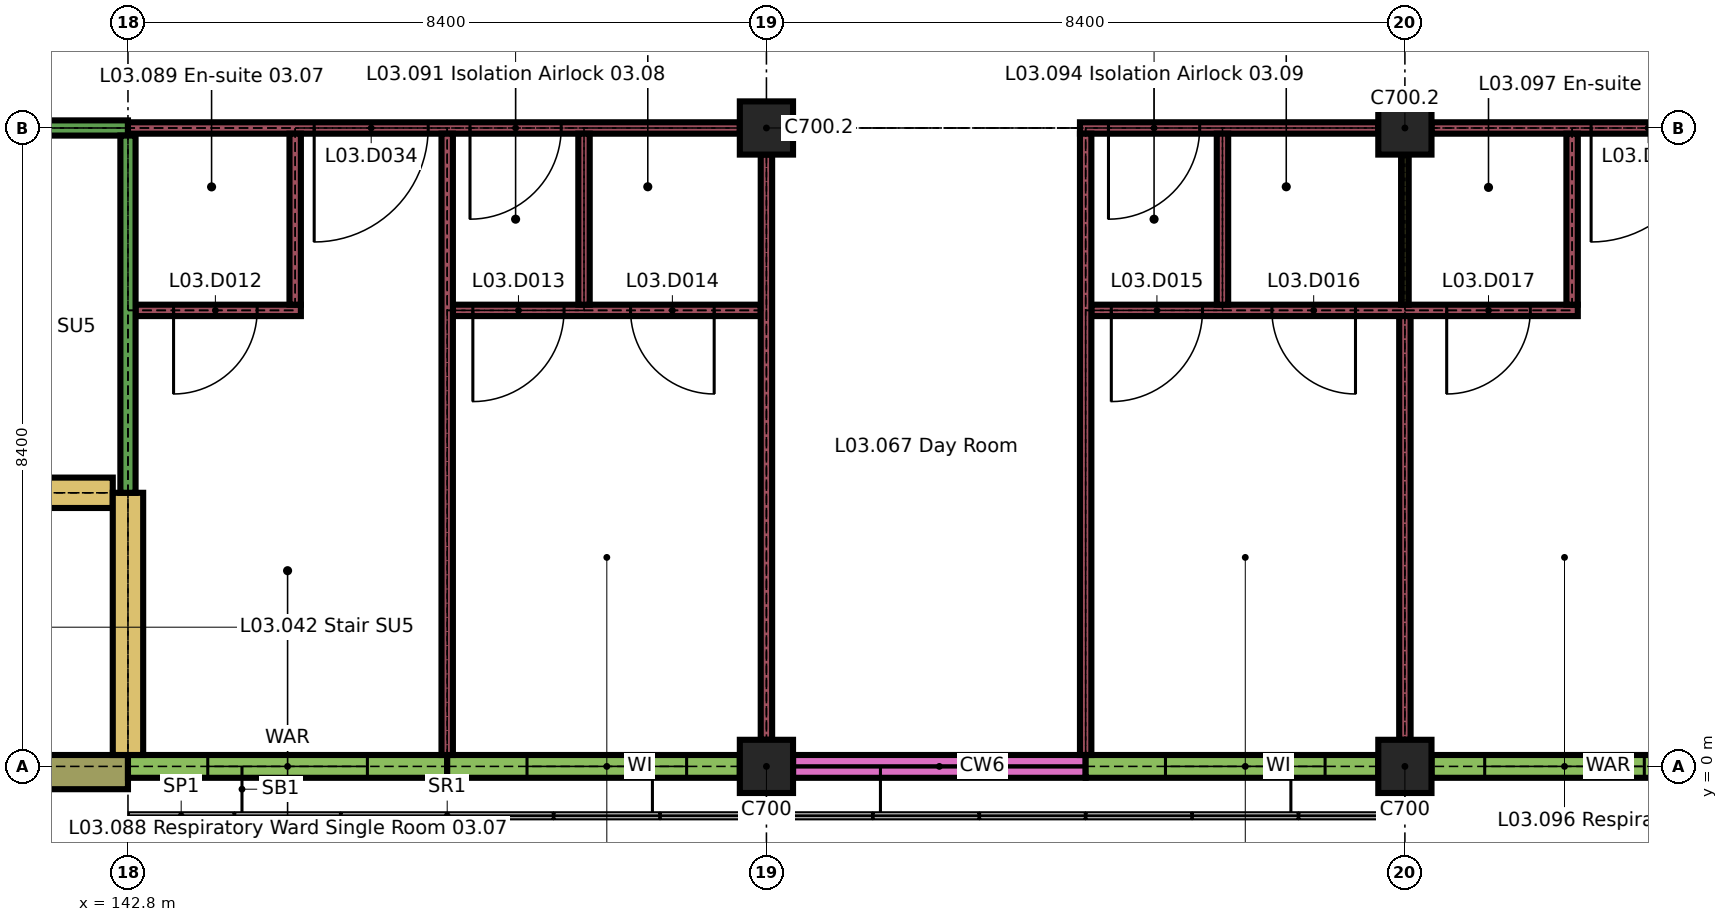
"""IFC4 building model, lengths in metres.
Left out: names, types, materials, properties, quantities, classifications, styles, units other than length and angle.
Written with IfcOpenShell. Run it as: python <this file> out.ifc"""

import sys

from ifc_helpers import new_model, si_unit, direction, frame, frame_2d, origin, origin_2d, place, context, subcontext, project, spatial, rectangle, extrude, element, fill, save


model = new_model("IFC4")
c1 = context("Model", 3, precision=1e-05, world=origin(), true_north=direction((0.0, 1.0)))
c2 = subcontext(c1, "Body", "Model", "MODEL_VIEW")
j1 = project(units=[si_unit("LENGTHUNIT", "METRE"), si_unit("PLANEANGLEUNIT", "RADIAN")], contexts=[c1])
p1 = place(None, origin())
s1 = spatial("IfcSite", under=j1, at=p1, CompositionType="ELEMENT")
p2 = place(p1, origin())
s2 = spatial("IfcBuilding", under=s1, at=p2, CompositionType="ELEMENT")
p3 = place(p2, frame((0.0, 0.0, 15.3)))
s3 = spatial("IfcBuildingStorey", under=s2, at=p3, CompositionType="ELEMENT", Elevation=15.3)
for number, where, z_axis, x_axis in (
    (1, (151.2, 0.0, 0.0), (0.0, 0.0, 1.0), (1.0, 0.0, 0.0)),
    (2, (159.6, 0.0, 0.0), (0.0, 0.0, 1.0), (1.0, 0.0, 0.0)),
    (3, (151.2, 8.4, 0.0), (0.0, 0.0, 1.0), (1.0, 0.0, 0.0)),
    (4, (159.6, 8.4, 0.0), (0.0, 0.0, 1.0), (1.0, 0.0, 0.0)),
):
    element("IfcColumn", number, at=place(p3, frame(where, z_axis=z_axis, x_axis=x_axis)), inside=s3, PredefinedType="COLUMN", context=c2, shape_type="SweptSolid", body=[
        extrude(rectangle(XDim=0.7, YDim=0.7, at=origin_2d()), origin(), (0.0, 0.0, 1.0), 3.26),
    ])
p4 = place(p3, frame((138.95, -0.075, 0.0), z_axis=(0.0, 0.0, 1.0), x_axis=(1.0, 0.0, 0.0)))
e5 = element("IfcWall", 5, at=p4, inside=s3, PredefinedType="SOLIDWALL", context=c2, shape_type="SweptSolid", body=[
    extrude(rectangle(XDim=3.85, YDim=0.45, at=frame_2d((1.925, 0.0))), origin(), (0.0, 0.0, 1.0), 3.26),
])
p5 = place(p3, frame((142.8, 0.0, 0.0), z_axis=(0.0, 0.0, 1.0), x_axis=(1.0, 0.0, 0.0)))
e6 = element("IfcWall", 6, at=p5, inside=s3, PredefinedType="SOLIDWALL", context=c2, shape_type="SweptSolid", body=[
    extrude(rectangle(XDim=4.2, YDim=0.3, at=frame_2d((2.1, 0.0))), origin(), (0.0, 0.0, 1.0), 2.96),
])
p6 = place(p5, frame((1.05, 0.0, 0.9)))
e7 = element("IfcOpeningElement", 7, at=p6, cuts=e6, PredefinedType="OPENING", context=c2, shape_type="SweptSolid", body=[
    extrude(rectangle(XDim=2.1, YDim=1.5, at=frame_2d((1.05, 0.75))), frame((0.0, 0.16, 0.0), z_axis=(0.0, -1.0, 0.0), x_axis=(1.0, 0.0, 0.0)), (0.0, 0.0, 1.0), 0.32),
])
p7 = place(p3, frame((147.0, 0.0, 0.0), z_axis=(0.0, 0.0, 1.0), x_axis=(1.0, 0.0, 0.0)))
e8 = element("IfcWall", 8, at=p7, inside=s3, PredefinedType="SOLIDWALL", context=c2, shape_type="SweptSolid", body=[
    extrude(rectangle(XDim=3.85, YDim=0.3, at=frame_2d((1.925, 0.0))), origin(), (0.0, 0.0, 1.0), 2.96),
])
p8 = place(p7, frame((1.05, 0.0, 0.9)))
e9 = element("IfcOpeningElement", 9, at=p8, cuts=e8, PredefinedType="OPENING", context=c2, shape_type="SweptSolid", body=[
    extrude(rectangle(XDim=2.1, YDim=1.5, at=frame_2d((1.05, 0.75))), frame((0.0, 0.16, 0.0), z_axis=(0.0, -1.0, 0.0), x_axis=(1.0, 0.0, 0.0)), (0.0, 0.0, 1.0), 0.32),
])
p9 = place(p3, frame((151.55, 0.0, 0.0), z_axis=(0.0, 0.0, 1.0), x_axis=(1.0, 0.0, 0.0)))
e10 = element("IfcWall", 10, at=p9, inside=s3, PredefinedType="SOLIDWALL", context=c2, shape_type="SweptSolid", body=[
    extrude(rectangle(XDim=3.85, YDim=0.3, at=frame_2d((1.925, 0.0))), origin(), (0.0, 0.0, 1.0), 0.6),
])
p10 = place(p3, frame((155.4, 0.0, 0.0), z_axis=(0.0, 0.0, 1.0), x_axis=(1.0, 0.0, 0.0)))
e11 = element("IfcWall", 11, at=p10, inside=s3, PredefinedType="SOLIDWALL", context=c2, shape_type="SweptSolid", body=[
    extrude(rectangle(XDim=3.85, YDim=0.3, at=frame_2d((1.925, 0.0))), origin(), (0.0, 0.0, 1.0), 2.96),
])
p11 = place(p10, frame((1.05, 0.0, 0.9)))
e12 = element("IfcOpeningElement", 12, at=p11, cuts=e11, PredefinedType="OPENING", context=c2, shape_type="SweptSolid", body=[
    extrude(rectangle(XDim=2.1, YDim=1.5, at=frame_2d((1.05, 0.75))), frame((0.0, 0.16, 0.0), z_axis=(0.0, -1.0, 0.0), x_axis=(1.0, 0.0, 0.0)), (0.0, 0.0, 1.0), 0.32),
])
p12 = place(p3, frame((159.95, 0.0, 0.0), z_axis=(0.0, 0.0, 1.0), x_axis=(1.0, 0.0, 0.0)))
e13 = element("IfcWall", 13, at=p12, inside=s3, PredefinedType="SOLIDWALL", context=c2, shape_type="SweptSolid", body=[
    extrude(rectangle(XDim=3.85, YDim=0.3, at=frame_2d((1.925, 0.0))), origin(), (0.0, 0.0, 1.0), 2.96),
])
p13 = place(p12, frame((0.7, 0.0, 0.9)))
e14 = element("IfcOpeningElement", 14, at=p13, cuts=e13, PredefinedType="OPENING", context=c2, shape_type="SweptSolid", body=[
    extrude(rectangle(XDim=2.1, YDim=1.5, at=frame_2d((1.05, 0.75))), frame((0.0, 0.16, 0.0), z_axis=(0.0, -1.0, 0.0), x_axis=(1.0, 0.0, 0.0)), (0.0, 0.0, 1.0), 0.32),
])
p14 = place(p3, frame((134.6, 3.6, 0.0), z_axis=(0.0, 0.0, 1.0), x_axis=(1.0, 0.0, 0.0)))
e15 = element("IfcWall", 15, at=p14, inside=s3, PredefinedType="SHEAR", context=c2, shape_type="SweptSolid", body=[
    extrude(rectangle(XDim=8.0, YDim=0.4, at=frame_2d((4.0, 0.0))), origin(), (0.0, 0.0, 1.0), 3.26),
])
p15 = place(p14, frame((0.4, 0.0, 0.0)))
e16 = element("IfcOpeningElement", 16, at=p15, cuts=e15, PredefinedType="OPENING", context=c2, shape_type="SweptSolid", body=[
    extrude(rectangle(XDim=1.2, YDim=2.1, at=frame_2d((0.6, 1.05))), frame((0.0, 0.21, 0.0), z_axis=(0.0, -1.0, 0.0), x_axis=(1.0, 0.0, 0.0)), (0.0, 0.0, 1.0), 0.42),
])
p16 = place(p3, frame((142.9, 6.0, 0.0), z_axis=(0.0, 0.0, 1.0), x_axis=(1.0, 0.0, 0.0)))
e17 = element("IfcWall", 17, at=p16, inside=s3, PredefinedType="PARTITIONING", context=c2, shape_type="SweptSolid", body=[
    extrude(rectangle(XDim=2.175, YDim=0.15, at=frame_2d((1.087, 0.0))), origin(), (0.0, 0.0, 1.0), 3.26),
])
p17 = place(p16, frame((0.5, 0.0, 0.0)))
e18 = element("IfcOpeningElement", 18, at=p17, cuts=e17, PredefinedType="OPENING", context=c2, shape_type="SweptSolid", body=[
    extrude(rectangle(XDim=1.1, YDim=2.1, at=frame_2d((0.55, 1.05))), frame((0.0, 0.085, 0.0), z_axis=(0.0, -1.0, 0.0), x_axis=(1.0, 0.0, 0.0)), (0.0, 0.0, 1.0), 0.17),
])
p18 = place(p3, frame((147.075, 6.0, 0.0), z_axis=(0.0, 0.0, 1.0), x_axis=(1.0, 0.0, 0.0)))
e19 = element("IfcWall", 19, at=p18, inside=s3, PredefinedType="PARTITIONING", context=c2, shape_type="SweptSolid", body=[
    extrude(rectangle(XDim=4.05, YDim=0.15, at=frame_2d((2.025, 0.0))), origin(), (0.0, 0.0, 1.0), 3.26),
])
p19 = place(p18, frame((0.262, 0.0, 0.0)))
e20 = element("IfcOpeningElement", 20, at=p19, cuts=e19, PredefinedType="OPENING", context=c2, shape_type="SweptSolid", body=[
    extrude(rectangle(XDim=1.2, YDim=2.1, at=frame_2d((0.6, 1.05))), frame((0.0, 0.085, 0.0), z_axis=(0.0, -1.0, 0.0), x_axis=(1.0, 0.0, 0.0)), (0.0, 0.0, 1.0), 0.17),
])
p20 = place(p18, frame((2.337, 0.0, 0.0)))
e21 = element("IfcOpeningElement", 21, at=p20, cuts=e19, PredefinedType="OPENING", context=c2, shape_type="SweptSolid", body=[
    extrude(rectangle(XDim=1.1, YDim=2.1, at=frame_2d((0.55, 1.05))), frame((0.0, 0.085, 0.0), z_axis=(0.0, -1.0, 0.0), x_axis=(1.0, 0.0, 0.0)), (0.0, 0.0, 1.0), 0.17),
])
p21 = place(p3, frame((155.475, 6.0, 0.0), z_axis=(0.0, 0.0, 1.0), x_axis=(1.0, 0.0, 0.0)))
e22 = element("IfcWall", 22, at=p21, inside=s3, PredefinedType="PARTITIONING", context=c2, shape_type="SweptSolid", body=[
    extrude(rectangle(XDim=6.4, YDim=0.15, at=frame_2d((3.2, 0.0))), origin(), (0.0, 0.0, 1.0), 3.26),
])
p22 = place(p21, frame((0.262, 0.0, 0.0)))
e23 = element("IfcOpeningElement", 23, at=p22, cuts=e22, PredefinedType="OPENING", context=c2, shape_type="SweptSolid", body=[
    extrude(rectangle(XDim=1.2, YDim=2.1, at=frame_2d((0.6, 1.05))), frame((0.0, 0.085, 0.0), z_axis=(0.0, -1.0, 0.0), x_axis=(1.0, 0.0, 0.0)), (0.0, 0.0, 1.0), 0.17),
])
p23 = place(p21, frame((2.375, 0.0, 0.0)))
e24 = element("IfcOpeningElement", 24, at=p23, cuts=e22, PredefinedType="OPENING", context=c2, shape_type="SweptSolid", body=[
    extrude(rectangle(XDim=1.1, YDim=2.1, at=frame_2d((0.55, 1.05))), frame((0.0, 0.085, 0.0), z_axis=(0.0, -1.0, 0.0), x_axis=(1.0, 0.0, 0.0)), (0.0, 0.0, 1.0), 0.17),
])
p24 = place(p21, frame((4.675, 0.0, 0.0)))
e25 = element("IfcOpeningElement", 25, at=p24, cuts=e22, PredefinedType="OPENING", context=c2, shape_type="SweptSolid", body=[
    extrude(rectangle(XDim=1.1, YDim=2.1, at=frame_2d((0.55, 1.05))), frame((0.0, 0.085, 0.0), z_axis=(0.0, -1.0, 0.0), x_axis=(1.0, 0.0, 0.0)), (0.0, 0.0, 1.0), 0.17),
])
p25 = place(p3, frame((134.3, 8.4, 0.0), z_axis=(0.0, 0.0, 1.0), x_axis=(1.0, 0.0, 0.0)))
e26 = element("IfcWall", 26, at=p25, inside=s3, PredefinedType="PARTITIONING", context=c2, shape_type="SweptSolid", body=[
    extrude(rectangle(XDim=8.5, YDim=0.2, at=frame_2d((4.25, 0.0))), origin(), (0.0, 0.0, 1.0), 3.26),
])
p26 = place(p25, frame((3.3, 0.0, 0.0)))
e27 = element("IfcOpeningElement", 27, at=p26, cuts=e26, PredefinedType="OPENING", context=c2, shape_type="SweptSolid", body=[
    extrude(rectangle(XDim=2.0, YDim=2.4, at=frame_2d((1.0, 1.2))), frame((0.0, 0.11, 0.0), z_axis=(0.0, -1.0, 0.0), x_axis=(1.0, 0.0, 0.0)), (0.0, 0.0, 1.0), 0.22),
])
p27 = place(p3, frame((142.8, 8.4, 0.0), z_axis=(0.0, 0.0, 1.0), x_axis=(1.0, 0.0, 0.0)))
e28 = element("IfcWall", 28, at=p27, inside=s3, PredefinedType="PARTITIONING", context=c2, shape_type="SweptSolid", body=[
    extrude(rectangle(XDim=8.05, YDim=0.15, at=frame_2d((4.025, 0.0))), origin(), (0.0, 0.0, 1.0), 3.26),
])
p28 = place(p27, frame((2.45, 0.0, 0.0)))
e29 = element("IfcOpeningElement", 29, at=p28, cuts=e28, PredefinedType="OPENING", context=c2, shape_type="SweptSolid", body=[
    extrude(rectangle(XDim=1.5, YDim=2.4, at=frame_2d((0.75, 1.2))), frame((0.0, 0.085, 0.0), z_axis=(0.0, -1.0, 0.0), x_axis=(1.0, 0.0, 0.0)), (0.0, 0.0, 1.0), 0.17),
])
p29 = place(p27, frame((4.5, 0.0, 0.0)))
e30 = element("IfcOpeningElement", 30, at=p29, cuts=e28, PredefinedType="OPENING", context=c2, shape_type="SweptSolid", body=[
    extrude(rectangle(XDim=1.2, YDim=2.1, at=frame_2d((0.6, 1.05))), frame((0.0, 0.085, 0.0), z_axis=(0.0, -1.0, 0.0), x_axis=(1.0, 0.0, 0.0)), (0.0, 0.0, 1.0), 0.17),
])
p30 = place(p3, frame((155.325, 8.4, 0.0), z_axis=(0.0, 0.0, 1.0), x_axis=(1.0, 0.0, 0.0)))
e31 = element("IfcWall", 31, at=p30, inside=s3, PredefinedType="PARTITIONING", context=c2, shape_type="SweptSolid", body=[
    extrude(rectangle(XDim=3.925, YDim=0.15, at=frame_2d((1.962, 0.0))), origin(), (0.0, 0.0, 1.0), 3.26),
])
p31 = place(p30, frame((0.375, 0.0, 0.0)))
e32 = element("IfcOpeningElement", 32, at=p31, cuts=e31, PredefinedType="OPENING", context=c2, shape_type="SweptSolid", body=[
    extrude(rectangle(XDim=1.2, YDim=2.1, at=frame_2d((0.6, 1.05))), frame((0.0, 0.085, 0.0), z_axis=(0.0, -1.0, 0.0), x_axis=(1.0, 0.0, 0.0)), (0.0, 0.0, 1.0), 0.17),
])
p32 = place(p3, frame((159.95, 8.4, 0.0), z_axis=(0.0, 0.0, 1.0), x_axis=(1.0, 0.0, 0.0)))
e33 = element("IfcWall", 33, at=p32, inside=s3, PredefinedType="PARTITIONING", context=c2, shape_type="SweptSolid", body=[
    extrude(rectangle(XDim=7.7, YDim=0.15, at=frame_2d((3.85, 0.0))), origin(), (0.0, 0.0, 1.0), 3.26),
])
p33 = place(p32, frame((2.1, 0.0, 0.0)))
e34 = element("IfcOpeningElement", 34, at=p33, cuts=e33, PredefinedType="OPENING", context=c2, shape_type="SweptSolid", body=[
    extrude(rectangle(XDim=1.5, YDim=2.4, at=frame_2d((0.75, 1.2))), frame((0.0, 0.085, 0.0), z_axis=(0.0, -1.0, 0.0), x_axis=(1.0, 0.0, 0.0)), (0.0, 0.0, 1.0), 0.17),
])
p34 = place(p32, frame((4.15, 0.0, 0.0)))
e35 = element("IfcOpeningElement", 35, at=p34, cuts=e33, PredefinedType="OPENING", context=c2, shape_type="SweptSolid", body=[
    extrude(rectangle(XDim=1.2, YDim=2.1, at=frame_2d((0.6, 1.05))), frame((0.0, 0.085, 0.0), z_axis=(0.0, -1.0, 0.0), x_axis=(1.0, 0.0, 0.0)), (0.0, 0.0, 1.0), 0.17),
])
p35 = place(p3, frame((142.8, 0.15, 0.0), z_axis=(0.0, 0.0, 1.0), x_axis=(0.0, 1.0, 0.0)))
e36 = element("IfcWall", 36, at=p35, inside=s3, PredefinedType="SHEAR", context=c2, shape_type="SweptSolid", body=[
    extrude(rectangle(XDim=3.45, YDim=0.4, at=frame_2d((1.725, 0.0))), origin(), (0.0, 0.0, 1.0), 3.26),
])
p36 = place(p3, frame((142.8, 3.6, 0.0), z_axis=(0.0, 0.0, 1.0), x_axis=(0.0, 1.0, 0.0)))
e37 = element("IfcWall", 37, at=p36, inside=s3, PredefinedType="PARTITIONING", context=c2, shape_type="SweptSolid", body=[
    extrude(rectangle(XDim=4.7, YDim=0.2, at=frame_2d((2.35, 0.0))), origin(), (0.0, 0.0, 1.0), 3.26),
])
p37 = place(p3, frame((145.0, 6.075, 0.0), z_axis=(0.0, 0.0, 1.0), x_axis=(0.0, 1.0, 0.0)))
e38 = element("IfcWall", 38, at=p37, inside=s3, PredefinedType="PARTITIONING", context=c2, shape_type="SweptSolid", body=[
    extrude(rectangle(XDim=2.25, YDim=0.15, at=frame_2d((1.125, 0.0))), origin(), (0.0, 0.0, 1.0), 3.26),
])
p38 = place(p3, frame((147.0, 0.15, 0.0), z_axis=(0.0, 0.0, 1.0), x_axis=(0.0, 1.0, 0.0)))
e39 = element("IfcWall", 39, at=p38, inside=s3, PredefinedType="PARTITIONING", context=c2, shape_type="SweptSolid", body=[
    extrude(rectangle(XDim=8.175, YDim=0.15, at=frame_2d((4.087, 0.0))), origin(), (0.0, 0.0, 1.0), 3.26),
])
p39 = place(p3, frame((148.8, 6.075, 0.0), z_axis=(0.0, 0.0, 1.0), x_axis=(0.0, 1.0, 0.0)))
e40 = element("IfcWall", 40, at=p39, inside=s3, PredefinedType="PARTITIONING", context=c2, shape_type="SweptSolid", body=[
    extrude(rectangle(XDim=2.25, YDim=0.15, at=frame_2d((1.125, 0.0))), origin(), (0.0, 0.0, 1.0), 3.26),
])
p40 = place(p3, frame((151.2, 0.35, 0.0), z_axis=(0.0, 0.0, 1.0), x_axis=(0.0, 1.0, 0.0)))
e41 = element("IfcWall", 41, at=p40, inside=s3, PredefinedType="PARTITIONING", context=c2, shape_type="SweptSolid", body=[
    extrude(rectangle(XDim=7.7, YDim=0.15, at=frame_2d((3.85, 0.0))), origin(), (0.0, 0.0, 1.0), 3.26),
])
p41 = place(p3, frame((155.4, 0.15, 0.0), z_axis=(0.0, 0.0, 1.0), x_axis=(0.0, 1.0, 0.0)))
e42 = element("IfcWall", 42, at=p41, inside=s3, PredefinedType="PARTITIONING", context=c2, shape_type="SweptSolid", body=[
    extrude(rectangle(XDim=8.175, YDim=0.15, at=frame_2d((4.087, 0.0))), origin(), (0.0, 0.0, 1.0), 3.26),
])
p42 = place(p3, frame((157.2, 6.075, 0.0), z_axis=(0.0, 0.0, 1.0), x_axis=(0.0, 1.0, 0.0)))
e43 = element("IfcWall", 43, at=p42, inside=s3, PredefinedType="PARTITIONING", context=c2, shape_type="SweptSolid", body=[
    extrude(rectangle(XDim=2.25, YDim=0.15, at=frame_2d((1.125, 0.0))), origin(), (0.0, 0.0, 1.0), 3.26),
])
p43 = place(p3, frame((159.6, 0.35, 0.0), z_axis=(0.0, 0.0, 1.0), x_axis=(0.0, 1.0, 0.0)))
e44 = element("IfcWall", 44, at=p43, inside=s3, PredefinedType="PARTITIONING", context=c2, shape_type="SweptSolid", body=[
    extrude(rectangle(XDim=5.575, YDim=0.15, at=frame_2d((2.788, 0.0))), origin(), (0.0, 0.0, 1.0), 3.26),
])
p44 = place(p3, frame((159.6, 6.075, 0.0), z_axis=(0.0, 0.0, 1.0), x_axis=(0.0, 1.0, 0.0)))
e45 = element("IfcWall", 45, at=p44, inside=s3, PredefinedType="PARTITIONING", context=c2, shape_type="SweptSolid", body=[
    extrude(rectangle(XDim=1.975, YDim=0.1, at=frame_2d((0.988, 0.0))), origin(), (0.0, 0.0, 1.0), 3.26),
])
p45 = place(p3, frame((161.8, 6.075, 0.0), z_axis=(0.0, 0.0, 1.0), x_axis=(0.0, 1.0, 0.0)))
e46 = element("IfcWall", 46, at=p45, inside=s3, PredefinedType="PARTITIONING", context=c2, shape_type="SweptSolid", body=[
    extrude(rectangle(XDim=2.25, YDim=0.15, at=frame_2d((1.125, 0.0))), origin(), (0.0, 0.0, 1.0), 3.26),
])
p46 = place(p6, origin())
e47 = element("IfcWindow", 47, at=p46, inside=s3, PartitioningType="DOUBLE_PANEL_VERTICAL", PredefinedType="WINDOW", context=c2, shape_type="SweptSolid", body=[
    extrude(rectangle(XDim=2.1, YDim=1.5, at=frame_2d((1.05, 0.75))), frame((0.0, 0.05, 0.0), z_axis=(0.0, -1.0, 0.0), x_axis=(1.0, 0.0, 0.0)), (0.0, 0.0, 1.0), 0.1),
])
fill(e7, e47)
p47 = place(p8, origin())
e48 = element("IfcWindow", 48, at=p47, inside=s3, PartitioningType="SINGLE_PANEL", PredefinedType="WINDOW", context=c2, shape_type="SweptSolid", body=[
    extrude(rectangle(XDim=2.1, YDim=1.5, at=frame_2d((1.05, 0.75))), frame((0.0, 0.045, 0.0), z_axis=(0.0, -1.0, 0.0), x_axis=(1.0, 0.0, 0.0)), (0.0, 0.0, 1.0), 0.09),
])
fill(e9, e48)
p48 = place(p11, origin())
e49 = element("IfcWindow", 49, at=p48, inside=s3, PartitioningType="SINGLE_PANEL", PredefinedType="WINDOW", context=c2, shape_type="SweptSolid", body=[
    extrude(rectangle(XDim=2.1, YDim=1.5, at=frame_2d((1.05, 0.75))), frame((0.0, 0.045, 0.0), z_axis=(0.0, -1.0, 0.0), x_axis=(1.0, 0.0, 0.0)), (0.0, 0.0, 1.0), 0.09),
])
fill(e12, e49)
p49 = place(p13, origin())
e50 = element("IfcWindow", 50, at=p49, inside=s3, PartitioningType="DOUBLE_PANEL_VERTICAL", PredefinedType="WINDOW", context=c2, shape_type="SweptSolid", body=[
    extrude(rectangle(XDim=2.1, YDim=1.5, at=frame_2d((1.05, 0.75))), frame((0.0, 0.05, 0.0), z_axis=(0.0, -1.0, 0.0), x_axis=(1.0, 0.0, 0.0)), (0.0, 0.0, 1.0), 0.1),
])
fill(e14, e50)
p50 = place(p17, origin())
e51 = element("IfcDoor", 51, at=p50, inside=s3, OperationType="SINGLE_SWING_LEFT", PredefinedType="DOOR", context=c2, shape_type="SweptSolid", body=[
    extrude(rectangle(XDim=1.1, YDim=2.1, at=frame_2d((0.55, 1.05))), frame((0.0, 0.025, 0.0), z_axis=(0.0, -1.0, 0.0), x_axis=(1.0, 0.0, 0.0)), (0.0, 0.0, 1.0), 0.05),
])
fill(e18, e51)
p51 = place(p19, origin())
e52 = element("IfcDoor", 52, at=p51, inside=s3, OperationType="SINGLE_SWING_LEFT", PredefinedType="DOOR", context=c2, shape_type="SweptSolid", body=[
    extrude(rectangle(XDim=1.2, YDim=2.1, at=frame_2d((0.6, 1.05))), frame((0.0, 0.05, 0.0), z_axis=(0.0, -1.0, 0.0), x_axis=(1.0, 0.0, 0.0)), (0.0, 0.0, 1.0), 0.1),
])
fill(e20, e52)
p52 = place(p20, origin())
e53 = element("IfcDoor", 53, at=p52, inside=s3, OperationType="SINGLE_SWING_RIGHT", PredefinedType="DOOR", context=c2, shape_type="SweptSolid", body=[
    extrude(rectangle(XDim=1.1, YDim=2.1, at=frame_2d((0.55, 1.05))), frame((0.0, 0.025, 0.0), z_axis=(0.0, -1.0, 0.0), x_axis=(1.0, 0.0, 0.0)), (0.0, 0.0, 1.0), 0.05),
])
fill(e21, e53)
p53 = place(p22, origin())
e54 = element("IfcDoor", 54, at=p53, inside=s3, OperationType="SINGLE_SWING_LEFT", PredefinedType="DOOR", context=c2, shape_type="SweptSolid", body=[
    extrude(rectangle(XDim=1.2, YDim=2.1, at=frame_2d((0.6, 1.05))), frame((0.0, 0.05, 0.0), z_axis=(0.0, -1.0, 0.0), x_axis=(1.0, 0.0, 0.0)), (0.0, 0.0, 1.0), 0.1),
])
fill(e23, e54)
p54 = place(p23, origin())
e55 = element("IfcDoor", 55, at=p54, inside=s3, OperationType="SINGLE_SWING_RIGHT", PredefinedType="DOOR", context=c2, shape_type="SweptSolid", body=[
    extrude(rectangle(XDim=1.1, YDim=2.1, at=frame_2d((0.55, 1.05))), frame((0.0, 0.025, 0.0), z_axis=(0.0, -1.0, 0.0), x_axis=(1.0, 0.0, 0.0)), (0.0, 0.0, 1.0), 0.05),
])
fill(e24, e55)
p55 = place(p24, origin())
e56 = element("IfcDoor", 56, at=p55, inside=s3, OperationType="SINGLE_SWING_LEFT", PredefinedType="DOOR", context=c2, shape_type="SweptSolid", body=[
    extrude(rectangle(XDim=1.1, YDim=2.1, at=frame_2d((0.55, 1.05))), frame((0.0, 0.025, 0.0), z_axis=(0.0, -1.0, 0.0), x_axis=(1.0, 0.0, 0.0)), (0.0, 0.0, 1.0), 0.05),
])
fill(e25, e56)
p56 = place(p28, origin())
e57 = element("IfcDoor", 57, at=p56, inside=s3, OperationType="SINGLE_SWING_LEFT", PredefinedType="DOOR", context=c2, shape_type="SweptSolid", body=[
    extrude(rectangle(XDim=1.5, YDim=2.4, at=frame_2d((0.75, 1.2))), frame((0.0, 0.03, 0.0), z_axis=(0.0, -1.0, 0.0), x_axis=(1.0, 0.0, 0.0)), (0.0, 0.0, 1.0), 0.06),
])
fill(e29, e57)
p57 = place(p29, origin())
e58 = element("IfcDoor", 58, at=p57, inside=s3, OperationType="SINGLE_SWING_LEFT", PredefinedType="DOOR", context=c2, shape_type="SweptSolid", body=[
    extrude(rectangle(XDim=1.2, YDim=2.1, at=frame_2d((0.6, 1.05))), frame((0.0, 0.05, 0.0), z_axis=(0.0, -1.0, 0.0), x_axis=(1.0, 0.0, 0.0)), (0.0, 0.0, 1.0), 0.1),
])
fill(e30, e58)
p58 = place(p31, origin())
e59 = element("IfcDoor", 59, at=p58, inside=s3, OperationType="SINGLE_SWING_LEFT", PredefinedType="DOOR", context=c2, shape_type="SweptSolid", body=[
    extrude(rectangle(XDim=1.2, YDim=2.1, at=frame_2d((0.6, 1.05))), frame((0.0, 0.05, 0.0), z_axis=(0.0, -1.0, 0.0), x_axis=(1.0, 0.0, 0.0)), (0.0, 0.0, 1.0), 0.1),
])
fill(e32, e59)
p59 = place(p33, origin())
e60 = element("IfcDoor", 60, at=p59, inside=s3, OperationType="SINGLE_SWING_LEFT", PredefinedType="DOOR", context=c2, shape_type="SweptSolid", body=[
    extrude(rectangle(XDim=1.5, YDim=2.4, at=frame_2d((0.75, 1.2))), frame((0.0, 0.03, 0.0), z_axis=(0.0, -1.0, 0.0), x_axis=(1.0, 0.0, 0.0)), (0.0, 0.0, 1.0), 0.06),
])
fill(e34, e60)
save(model, sys.argv[1])
